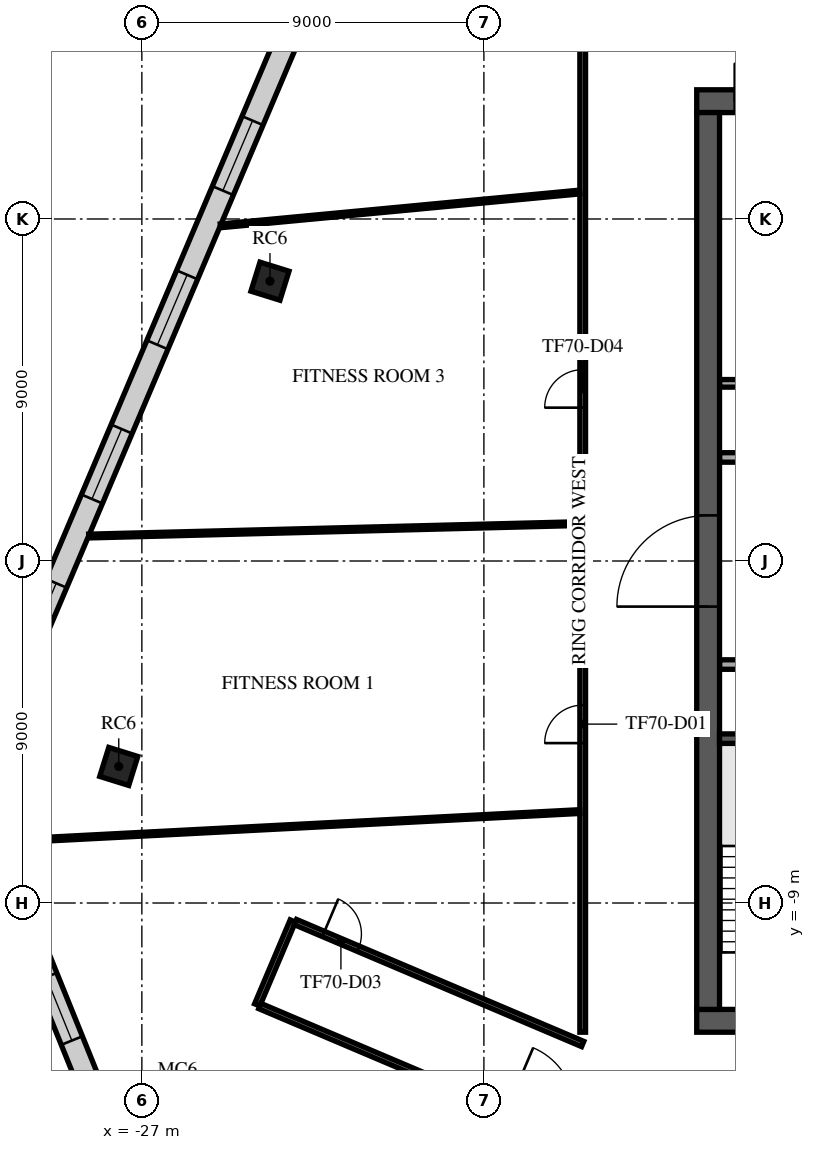
"""IFC4 building model, lengths in metres.
Left out: names, types, materials, properties, quantities, classifications, styles, units other than length and angle.
Written with IfcOpenShell. Run it as: python <this file> out.ifc"""

import sys

from ifc_helpers import new_model, si_unit, direction, frame, frame_2d, origin, origin_2d, place, context, subcontext, project, spatial, rectangle, extrude, element, fill, save


model = new_model("IFC4")
c1 = context("Model", 3, precision=1e-05, world=origin(), true_north=direction((0.0, 1.0)))
c2 = subcontext(c1, "Body", "Model", "MODEL_VIEW")
j1 = project(units=[si_unit("LENGTHUNIT", "METRE"), si_unit("PLANEANGLEUNIT", "RADIAN")], contexts=[c1])
p1 = place(None, origin())
s1 = spatial("IfcSite", under=j1, at=p1, CompositionType="ELEMENT")
p2 = place(p1, origin())
s2 = spatial("IfcBuilding", under=s1, at=p2, CompositionType="ELEMENT")
p3 = place(p2, frame((0.0, 0.0, 296.5)))
s3 = spatial("IfcBuildingStorey", under=s2, at=p3, CompositionType="ELEMENT", Elevation=296.5)
for number, where, z_axis, x_axis in (
    (1, (-23.629, 7.363, -0.35), (0.0, 0.0, 1.0), (0.298, 0.955, 0.0)),
    (2, (-27.608, -5.406, -0.35), (0.0, 0.0, 1.0), (0.298, 0.955, 0.0)),
):
    element("IfcColumn", number, at=place(p3, frame(where, z_axis=z_axis, x_axis=x_axis)), inside=s3, PredefinedType="COLUMN", context=c2, shape_type="SweptSolid", body=[
        extrude(rectangle(XDim=0.8, YDim=0.8, at=origin_2d()), origin(), (0.0, 0.0, 1.0), 4.35),
    ])
p4 = place(p3, frame((-12.4, 12.1, 0.0), z_axis=(0.0, 0.0, 1.0), x_axis=(1.0, 0.0, 0.0)))
e3 = element("IfcWall", 3, at=p4, inside=s3, PredefinedType="SHEAR", context=c2, shape_type="SweptSolid", body=[
    extrude(rectangle(XDim=24.8, YDim=0.6, at=frame_2d((12.4, 0.0))), origin(), (0.0, 0.0, 1.0), 3.65),
])
p5 = place(p4, frame((11.2, 0.0, 0.0)))
e4 = element("IfcOpeningElement", 4, at=p5, cuts=e3, PredefinedType="OPENING", context=c2, shape_type="SweptSolid", body=[
    extrude(rectangle(XDim=2.4, YDim=2.4, at=frame_2d((1.2, 1.2))), frame((0.0, 0.31, 0.0), z_axis=(0.0, -1.0, 0.0), x_axis=(1.0, 0.0, 0.0)), (0.0, 0.0, 1.0), 0.62),
])
p6 = place(p4, frame((22.025, 0.0, 0.0)))
e5 = element("IfcOpeningElement", 5, at=p6, cuts=e3, PredefinedType="OPENING", context=c2, shape_type="SweptSolid", body=[
    extrude(rectangle(XDim=1.2, YDim=2.1, at=frame_2d((0.6, 1.05))), frame((0.0, 0.31, 0.0), z_axis=(0.0, -1.0, 0.0), x_axis=(1.0, 0.0, 0.0)), (0.0, 0.0, 1.0), 0.62),
])
p7 = place(p4, frame((1.0, 0.0, 0.0)))
e6 = element("IfcOpeningElement", 6, at=p7, cuts=e3, PredefinedType="OPENING", context=c2, shape_type="SweptSolid", body=[
    extrude(rectangle(XDim=1.0, YDim=2.1, at=frame_2d((0.5, 1.05))), frame((0.0, 0.31, 0.0), z_axis=(0.0, -1.0, 0.0), x_axis=(1.0, 0.0, 0.0)), (0.0, 0.0, 1.0), 0.62),
])
p8 = place(p3, frame((-12.4, -12.1, 0.0), z_axis=(0.0, 0.0, 1.0), x_axis=(1.0, 0.0, 0.0)))
e7 = element("IfcWall", 7, at=p8, inside=s3, PredefinedType="SHEAR", context=c2, shape_type="SweptSolid", body=[
    extrude(rectangle(XDim=24.8, YDim=0.6, at=frame_2d((12.4, 0.0))), origin(), (0.0, 0.0, 1.0), 3.65),
])
p9 = place(p8, frame((7.3, 0.0, 0.0)))
e8 = element("IfcOpeningElement", 8, at=p9, cuts=e7, PredefinedType="OPENING", context=c2, shape_type="SweptSolid", body=[
    extrude(rectangle(XDim=2.0, YDim=2.1, at=frame_2d((1.0, 1.05))), frame((0.0, 0.31, 0.0), z_axis=(0.0, -1.0, 0.0), x_axis=(1.0, 0.0, 0.0)), (0.0, 0.0, 1.0), 0.62),
])
p10 = place(p8, frame((17.425, 0.0, 0.0)))
e9 = element("IfcOpeningElement", 9, at=p10, cuts=e7, PredefinedType="OPENING", context=c2, shape_type="SweptSolid", body=[
    extrude(rectangle(XDim=1.2, YDim=2.1, at=frame_2d((0.6, 1.05))), frame((0.0, 0.31, 0.0), z_axis=(0.0, -1.0, 0.0), x_axis=(1.0, 0.0, 0.0)), (0.0, 0.0, 1.0), 0.62),
])
p11 = place(p8, frame((1.575, 0.0, 0.0)))
e10 = element("IfcOpeningElement", 10, at=p11, cuts=e7, PredefinedType="OPENING", context=c2, shape_type="SweptSolid", body=[
    extrude(rectangle(XDim=1.2, YDim=2.1, at=frame_2d((0.6, 1.05))), frame((0.0, 0.31, 0.0), z_axis=(0.0, -1.0, 0.0), x_axis=(1.0, 0.0, 0.0)), (0.0, 0.0, 1.0), 0.62),
])
p12 = place(p8, frame((22.025, 0.0, 0.0)))
e11 = element("IfcOpeningElement", 11, at=p12, cuts=e7, PredefinedType="OPENING", context=c2, shape_type="SweptSolid", body=[
    extrude(rectangle(XDim=1.2, YDim=2.1, at=frame_2d((0.6, 1.05))), frame((0.0, 0.31, 0.0), z_axis=(0.0, -1.0, 0.0), x_axis=(1.0, 0.0, 0.0)), (0.0, 0.0, 1.0), 0.62),
])
p13 = place(p3, frame((-12.1, -11.8, 0.0), z_axis=(0.0, 0.0, 1.0), x_axis=(0.0, 1.0, 0.0)))
e12 = element("IfcWall", 12, at=p13, inside=s3, PredefinedType="SHEAR", context=c2, shape_type="SweptSolid", body=[
    extrude(rectangle(XDim=23.6, YDim=0.6, at=frame_2d((11.8, 0.0))), origin(), (0.0, 0.0, 1.0), 3.65),
])
p14 = place(p13, frame((10.6, 0.0, 0.0)))
e13 = element("IfcOpeningElement", 13, at=p14, cuts=e12, PredefinedType="OPENING", context=c2, shape_type="SweptSolid", body=[
    extrude(rectangle(XDim=2.4, YDim=2.4, at=frame_2d((1.2, 1.2))), frame((0.0, 0.31, 0.0), z_axis=(0.0, -1.0, 0.0), x_axis=(1.0, 0.0, 0.0)), (0.0, 0.0, 1.0), 0.62),
])
p15 = place(p3, frame((-8.65, -4.675, 0.0), z_axis=(0.0, 0.0, 1.0), x_axis=(-1.0, 0.0, 0.0)))
e14 = element("IfcWall", 14, at=p15, inside=s3, PredefinedType="SOLIDWALL", context=c2, shape_type="SweptSolid", body=[
    extrude(rectangle(XDim=3.15, YDim=0.25, at=frame_2d((1.575, 0.0))), origin(), (0.0, 0.0, 1.0), 3.65),
])
p16 = place(p3, frame((-11.795, -2.725, 0.0), z_axis=(0.0, 0.0, 1.0), x_axis=(1.0, 0.0, 0.0)))
e15 = element("IfcWall", 15, at=p16, inside=s3, PredefinedType="PARTITIONING", context=c2, shape_type="SweptSolid", body=[
    extrude(rectangle(XDim=14.415, YDim=0.25, at=frame_2d((7.208, 0.0))), origin(), (0.0, 0.0, 1.0), 3.65),
])
p17 = place(p16, frame((1.295, 0.0, 0.0)))
e16 = element("IfcOpeningElement", 16, at=p17, cuts=e15, PredefinedType="OPENING", context=c2, shape_type="SweptSolid", body=[
    extrude(rectangle(XDim=1.0, YDim=2.1, at=frame_2d((0.5, 1.05))), frame((0.0, 0.135, 0.0), z_axis=(0.0, -1.0, 0.0), x_axis=(1.0, 0.0, 0.0)), (0.0, 0.0, 1.0), 0.27),
])
p18 = place(p16, frame((4.42, 0.0, 0.0)))
e17 = element("IfcOpeningElement", 17, at=p18, cuts=e15, PredefinedType="OPENING", context=c2, shape_type="SweptSolid", body=[
    extrude(rectangle(XDim=1.0, YDim=2.1, at=frame_2d((0.5, 1.05))), frame((0.0, 0.135, 0.0), z_axis=(0.0, -1.0, 0.0), x_axis=(1.0, 0.0, 0.0)), (0.0, 0.0, 1.0), 0.27),
])
p19 = place(p16, frame((9.92, 0.0, 0.0)))
e18 = element("IfcOpeningElement", 18, at=p19, cuts=e15, PredefinedType="OPENING", context=c2, shape_type="SweptSolid", body=[
    extrude(rectangle(XDim=1.0, YDim=2.1, at=frame_2d((0.5, 1.05))), frame((0.0, 0.135, 0.0), z_axis=(0.0, -1.0, 0.0), x_axis=(1.0, 0.0, 0.0)), (0.0, 0.0, 1.0), 0.27),
])
p20 = place(p3, frame((-11.795, 2.725, 0.0), z_axis=(0.0, 0.0, 1.0), x_axis=(1.0, 0.0, 0.0)))
e19 = element("IfcWall", 19, at=p20, inside=s3, PredefinedType="PARTITIONING", context=c2, shape_type="SweptSolid", body=[
    extrude(rectangle(XDim=23.59, YDim=0.25, at=frame_2d((11.795, 0.0))), origin(), (0.0, 0.0, 1.0), 3.65),
])
p21 = place(p20, frame((21.345, 0.0, 0.0)))
e20 = element("IfcOpeningElement", 20, at=p21, cuts=e19, PredefinedType="OPENING", context=c2, shape_type="SweptSolid", body=[
    extrude(rectangle(XDim=0.9, YDim=2.1, at=frame_2d((0.45, 1.05))), frame((0.0, 0.135, 0.0), z_axis=(0.0, -1.0, 0.0), x_axis=(1.0, 0.0, 0.0)), (0.0, 0.0, 1.0), 0.27),
])
p22 = place(p20, frame((1.345, 0.0, 0.0)))
e21 = element("IfcOpeningElement", 21, at=p22, cuts=e19, PredefinedType="OPENING", context=c2, shape_type="SweptSolid", body=[
    extrude(rectangle(XDim=0.9, YDim=2.1, at=frame_2d((0.45, 1.05))), frame((0.0, 0.135, 0.0), z_axis=(0.0, -1.0, 0.0), x_axis=(1.0, 0.0, 0.0)), (0.0, 0.0, 1.0), 0.27),
])
p23 = place(p20, frame((4.42, 0.0, 0.0)))
e22 = element("IfcOpeningElement", 22, at=p23, cuts=e19, PredefinedType="OPENING", context=c2, shape_type="SweptSolid", body=[
    extrude(rectangle(XDim=1.0, YDim=2.1, at=frame_2d((0.5, 1.05))), frame((0.0, 0.135, 0.0), z_axis=(0.0, -1.0, 0.0), x_axis=(1.0, 0.0, 0.0)), (0.0, 0.0, 1.0), 0.27),
])
p24 = place(p20, frame((9.82, 0.0, 0.0)))
e23 = element("IfcOpeningElement", 23, at=p24, cuts=e19, PredefinedType="OPENING", context=c2, shape_type="SweptSolid", body=[
    extrude(rectangle(XDim=1.2, YDim=2.1, at=frame_2d((0.6, 1.05))), frame((0.0, 0.135, 0.0), z_axis=(0.0, -1.0, 0.0), x_axis=(1.0, 0.0, 0.0)), (0.0, 0.0, 1.0), 0.27),
])
p25 = place(p3, frame((-11.795, 4.675, 0.0), z_axis=(0.0, 0.0, 1.0), x_axis=(1.0, 0.0, 0.0)))
e24 = element("IfcWall", 24, at=p25, inside=s3, PredefinedType="PARTITIONING", context=c2, shape_type="SweptSolid", body=[
    extrude(rectangle(XDim=3.645, YDim=0.2, at=frame_2d((1.823, 0.0))), origin(), (0.0, 0.0, 1.0), 3.65),
])
p26 = place(p3, frame((-15.005, 32.985, 0.0), z_axis=(0.0, 0.0, 1.0), x_axis=(-0.39073034436, -0.920505186295, 0.0)))
e25 = element("IfcWall", 25, at=p26, inside=s3, PredefinedType="STANDARD", context=c2, shape_type="SweptSolid", body=[
    extrude(rectangle(XDim=48.49, YDim=0.6, at=frame_2d((24.245, 0.0))), origin(), (0.0, 0.0, 1.0), 3.65),
])
p27 = place(p26, frame((1.204, 0.0, 0.9)))
e26 = element("IfcOpeningElement", 26, at=p27, cuts=e25, PredefinedType="OPENING", context=c2, shape_type="SweptSolid", body=[
    extrude(rectangle(XDim=2.0, YDim=2.1, at=frame_2d((1.0, 1.05))), frame((0.0, 0.31, 0.0), z_axis=(0.0, -1.0, 0.0), x_axis=(1.0, 0.0, 0.0)), (0.0, 0.0, 1.0), 0.62),
])
p28 = place(p26, frame((5.612, 0.0, 0.9)))
e27 = element("IfcOpeningElement", 27, at=p28, cuts=e25, PredefinedType="OPENING", context=c2, shape_type="SweptSolid", body=[
    extrude(rectangle(XDim=2.0, YDim=2.1, at=frame_2d((1.0, 1.05))), frame((0.0, 0.31, 0.0), z_axis=(0.0, -1.0, 0.0), x_axis=(1.0, 0.0, 0.0)), (0.0, 0.0, 1.0), 0.62),
])
p29 = place(p26, frame((10.021, 0.0, 0.9)))
e28 = element("IfcOpeningElement", 28, at=p29, cuts=e25, PredefinedType="OPENING", context=c2, shape_type="SweptSolid", body=[
    extrude(rectangle(XDim=2.0, YDim=2.1, at=frame_2d((1.0, 1.05))), frame((0.0, 0.31, 0.0), z_axis=(0.0, -1.0, 0.0), x_axis=(1.0, 0.0, 0.0)), (0.0, 0.0, 1.0), 0.62),
])
p30 = place(p26, frame((14.428, 0.0, 0.9)))
e29 = element("IfcOpeningElement", 29, at=p30, cuts=e25, PredefinedType="OPENING", context=c2, shape_type="SweptSolid", body=[
    extrude(rectangle(XDim=2.0, YDim=2.1, at=frame_2d((1.0, 1.05))), frame((0.0, 0.31, 0.0), z_axis=(0.0, -1.0, 0.0), x_axis=(1.0, 0.0, 0.0)), (0.0, 0.0, 1.0), 0.62),
])
p31 = place(p26, frame((18.837, 0.0, 0.9)))
e30 = element("IfcOpeningElement", 30, at=p31, cuts=e25, PredefinedType="OPENING", context=c2, shape_type="SweptSolid", body=[
    extrude(rectangle(XDim=2.0, YDim=2.1, at=frame_2d((1.0, 1.05))), frame((0.0, 0.31, 0.0), z_axis=(0.0, -1.0, 0.0), x_axis=(1.0, 0.0, 0.0)), (0.0, 0.0, 1.0), 0.62),
])
p32 = place(p26, frame((23.245, 0.0, 0.9)))
e31 = element("IfcOpeningElement", 31, at=p32, cuts=e25, PredefinedType="OPENING", context=c2, shape_type="SweptSolid", body=[
    extrude(rectangle(XDim=2.0, YDim=2.1, at=frame_2d((1.0, 1.05))), frame((0.0, 0.31, 0.0), z_axis=(0.0, -1.0, 0.0), x_axis=(1.0, 0.0, 0.0)), (0.0, 0.0, 1.0), 0.62),
])
p33 = place(p26, frame((27.653, 0.0, 0.9)))
e32 = element("IfcOpeningElement", 32, at=p33, cuts=e25, PredefinedType="OPENING", context=c2, shape_type="SweptSolid", body=[
    extrude(rectangle(XDim=2.0, YDim=2.1, at=frame_2d((1.0, 1.05))), frame((0.0, 0.31, 0.0), z_axis=(0.0, -1.0, 0.0), x_axis=(1.0, 0.0, 0.0)), (0.0, 0.0, 1.0), 0.62),
])
p34 = place(p26, frame((32.061, 0.0, 0.9)))
e33 = element("IfcOpeningElement", 33, at=p34, cuts=e25, PredefinedType="OPENING", context=c2, shape_type="SweptSolid", body=[
    extrude(rectangle(XDim=2.0, YDim=2.1, at=frame_2d((1.0, 1.05))), frame((0.0, 0.31, 0.0), z_axis=(0.0, -1.0, 0.0), x_axis=(1.0, 0.0, 0.0)), (0.0, 0.0, 1.0), 0.62),
])
p35 = place(p26, frame((36.469, 0.0, 0.9)))
e34 = element("IfcOpeningElement", 34, at=p35, cuts=e25, PredefinedType="OPENING", context=c2, shape_type="SweptSolid", body=[
    extrude(rectangle(XDim=2.0, YDim=2.1, at=frame_2d((1.0, 1.05))), frame((0.0, 0.31, 0.0), z_axis=(0.0, -1.0, 0.0), x_axis=(1.0, 0.0, 0.0)), (0.0, 0.0, 1.0), 0.62),
])
p36 = place(p26, frame((40.877, 0.0, 0.9)))
e35 = element("IfcOpeningElement", 35, at=p36, cuts=e25, PredefinedType="OPENING", context=c2, shape_type="SweptSolid", body=[
    extrude(rectangle(XDim=2.0, YDim=2.1, at=frame_2d((1.0, 1.05))), frame((0.0, 0.31, 0.0), z_axis=(0.0, -1.0, 0.0), x_axis=(1.0, 0.0, 0.0)), (0.0, 0.0, 1.0), 0.62),
])
p37 = place(p26, frame((45.285, 0.0, 0.9)))
e36 = element("IfcOpeningElement", 36, at=p37, cuts=e25, PredefinedType="OPENING", context=c2, shape_type="SweptSolid", body=[
    extrude(rectangle(XDim=2.0, YDim=2.1, at=frame_2d((1.0, 1.05))), frame((0.0, 0.31, 0.0), z_axis=(0.0, -1.0, 0.0), x_axis=(1.0, 0.0, 0.0)), (0.0, 0.0, 1.0), 0.62),
])
p38 = place(p3, frame((-29.976, -9.815, 0.0), z_axis=(0.0, 0.0, 1.0), x_axis=(0.374622134294, -0.927177575493, 0.0)))
e37 = element("IfcWall", 37, at=p38, inside=s3, PredefinedType="STANDARD", context=c2, shape_type="SweptSolid", body=[
    extrude(rectangle(XDim=8.5, YDim=0.6, at=frame_2d((4.25, 0.0))), origin(), (0.0, 0.0, 1.0), 3.65),
])
p39 = place(p38, frame((1.225, 0.0, 0.9)))
e38 = element("IfcOpeningElement", 38, at=p39, cuts=e37, PredefinedType="OPENING", context=c2, shape_type="SweptSolid", body=[
    extrude(rectangle(XDim=1.8, YDim=2.1, at=frame_2d((0.9, 1.05))), frame((0.0, 0.31, 0.0), z_axis=(0.0, -1.0, 0.0), x_axis=(1.0, 0.0, 0.0)), (0.0, 0.0, 1.0), 0.62),
])
p40 = place(p3, frame((-23.965, -11.682, 0.0), z_axis=(0.0, 0.0, 1.0), x_axis=(0.390356552854, 0.920663761448, 0.0)))
e39 = element("IfcWall", 39, at=p40, inside=s3, PredefinedType="PARTITIONING", context=c2, shape_type="SweptSolid", body=[
    extrude(rectangle(XDim=2.4, YDim=0.15, at=frame_2d((1.2, 0.0))), origin(), (0.0, 0.0, 1.0), 3.25),
])
p41 = place(p3, frame((-23.896, -11.711, 0.0), z_axis=(0.0, 0.0, 1.0), x_axis=(0.920507643781, -0.390724554821, 0.0)))
e40 = element("IfcWall", 40, at=p41, inside=s3, PredefinedType="PARTITIONING", context=c2, shape_type="SweptSolid", body=[
    extrude(rectangle(XDim=34.917, YDim=0.15, at=frame_2d((17.458, 0.0))), origin(), (0.0, 0.0, 1.0), 3.25),
])
p42 = place(p41, frame((7.05, 0.0, 0.0)))
e41 = element("IfcOpeningElement", 41, at=p42, cuts=e40, PredefinedType="OPENING", context=c2, shape_type="SweptSolid", body=[
    extrude(rectangle(XDim=1.8, YDim=2.1, at=frame_2d((0.9, 1.05))), frame((0.0, 0.085, 0.0), z_axis=(0.0, -1.0, 0.0), x_axis=(1.0, 0.0, 0.0)), (0.0, 0.0, 1.0), 0.17),
])
p43 = place(p41, frame((14.27, 0.0, 0.0)))
e42 = element("IfcOpeningElement", 42, at=p43, cuts=e40, PredefinedType="OPENING", context=c2, shape_type="SweptSolid", body=[
    extrude(rectangle(XDim=1.0, YDim=2.1, at=frame_2d((0.5, 1.05))), frame((0.0, 0.085, 0.0), z_axis=(0.0, -1.0, 0.0), x_axis=(1.0, 0.0, 0.0)), (0.0, 0.0, 1.0), 0.17),
])
p44 = place(p41, frame((29.011, 0.0, 0.0)))
e43 = element("IfcOpeningElement", 43, at=p44, cuts=e40, PredefinedType="OPENING", context=c2, shape_type="SweptSolid", body=[
    extrude(rectangle(XDim=1.0, YDim=2.1, at=frame_2d((0.5, 1.05))), frame((0.0, 0.085, 0.0), z_axis=(0.0, -1.0, 0.0), x_axis=(1.0, 0.0, 0.0)), (0.0, 0.0, 1.0), 0.17),
])
p45 = place(p3, frame((-22.959, -9.501, 0.0), z_axis=(0.0, 0.0, 1.0), x_axis=(0.920500461351, -0.390741475471, 0.0)))
e44 = element("IfcWall", 44, at=p45, inside=s3, PredefinedType="PARTITIONING", context=c2, shape_type="SweptSolid", body=[
    extrude(rectangle(XDim=8.212, YDim=0.15, at=frame_2d((4.106, 0.0))), origin(), (0.0, 0.0, 1.0), 3.25),
])
p46 = place(p45, frame((0.8, 0.0, 0.0)))
e45 = element("IfcOpeningElement", 45, at=p46, cuts=e44, PredefinedType="OPENING", context=c2, shape_type="SweptSolid", body=[
    extrude(rectangle(XDim=1.0, YDim=2.1, at=frame_2d((0.5, 1.05))), frame((0.0, 0.085, 0.0), z_axis=(0.0, -1.0, 0.0), x_axis=(1.0, 0.0, 0.0)), (0.0, 0.0, 1.0), 0.17),
])
p47 = place(p3, frame((-15.4, -12.4, 0.0), z_axis=(0.0, 0.0, 1.0), x_axis=(0.0, 1.0, 0.0)))
e46 = element("IfcWall", 46, at=p47, inside=s3, PredefinedType="PARTITIONING", context=c2, shape_type="SweptSolid", body=[
    extrude(rectangle(XDim=27.8, YDim=0.15, at=frame_2d((13.9, 0.0))), origin(), (0.0, 0.0, 1.0), 3.25),
])
p48 = place(p47, frame((7.608, 0.0, 0.0)))
e47 = element("IfcOpeningElement", 47, at=p48, cuts=e46, PredefinedType="OPENING", context=c2, shape_type="SweptSolid", body=[
    extrude(rectangle(XDim=1.0, YDim=2.1, at=frame_2d((0.5, 1.05))), frame((0.0, 0.085, 0.0), z_axis=(0.0, -1.0, 0.0), x_axis=(1.0, 0.0, 0.0)), (0.0, 0.0, 1.0), 0.17),
])
p49 = place(p47, frame((16.435, 0.0, 0.0)))
e48 = element("IfcOpeningElement", 48, at=p49, cuts=e46, PredefinedType="OPENING", context=c2, shape_type="SweptSolid", body=[
    extrude(rectangle(XDim=1.0, YDim=2.1, at=frame_2d((0.5, 1.05))), frame((0.0, 0.085, 0.0), z_axis=(0.0, -1.0, 0.0), x_axis=(1.0, 0.0, 0.0)), (0.0, 0.0, 1.0), 0.17),
])
p50 = place(p3, frame((-31.836, -7.44, 0.0), z_axis=(0.0, 0.0, 1.0), x_axis=(0.998664003793, 0.05167405082, 0.0)))
e49 = element("IfcWall", 49, at=p50, inside=s3, PredefinedType="PARTITIONING", context=c2, shape_type="SweptSolid", body=[
    extrude(rectangle(XDim=16.38, YDim=0.1, at=frame_2d((8.19, 0.0))), origin(), (0.0, 0.0, 1.0), 3.65),
])
p51 = place(p3, frame((-28.399, 0.657, 0.0), z_axis=(0.0, 0.0, 1.0), x_axis=(0.999679226592, 0.025326743172, 0.0)))
e50 = element("IfcWall", 50, at=p51, inside=s3, PredefinedType="PARTITIONING", context=c2, shape_type="SweptSolid", body=[
    extrude(rectangle(XDim=12.927, YDim=0.1, at=frame_2d((6.463, 0.0))), origin(), (0.0, 0.0, 1.0), 3.25),
])
p52 = place(p3, frame((-24.934, 8.819, 0.0), z_axis=(0.0, 0.0, 1.0), x_axis=(0.995594865602, 0.0937596053, 0.0)))
e51 = element("IfcWall", 51, at=p52, inside=s3, PredefinedType="PARTITIONING", context=c2, shape_type="SweptSolid", body=[
    extrude(rectangle(XDim=9.496, YDim=0.1, at=frame_2d((4.748, 0.0))), origin(), (0.0, 0.0, 1.0), 3.65),
])
p53 = place(p14, origin())
e52 = element("IfcDoor", 52, at=p53, inside=s3, OperationType="SINGLE_SWING_LEFT", PredefinedType="DOOR", context=c2, shape_type="SweptSolid", body=[
    extrude(rectangle(XDim=2.4, YDim=2.4, at=frame_2d((1.2, 1.2))), frame((0.0, 0.025, 0.0), z_axis=(0.0, -1.0, 0.0), x_axis=(1.0, 0.0, 0.0)), (0.0, 0.0, 1.0), 0.05),
])
fill(e13, e52)
p54 = place(p32, origin())
e53 = element("IfcWindow", 53, at=p54, inside=s3, PartitioningType="SINGLE_PANEL", PredefinedType="WINDOW", context=c2, shape_type="SweptSolid", body=[
    extrude(rectangle(XDim=2.0, YDim=2.1, at=frame_2d((1.0, 1.05))), frame((0.0, 0.03, 0.0), z_axis=(0.0, -1.0, 0.0), x_axis=(1.0, 0.0, 0.0)), (0.0, 0.0, 1.0), 0.06),
])
fill(e31, e53)
p55 = place(p33, origin())
e54 = element("IfcWindow", 54, at=p55, inside=s3, PartitioningType="SINGLE_PANEL", PredefinedType="WINDOW", context=c2, shape_type="SweptSolid", body=[
    extrude(rectangle(XDim=2.0, YDim=2.1, at=frame_2d((1.0, 1.05))), frame((0.0, 0.03, 0.0), z_axis=(0.0, -1.0, 0.0), x_axis=(1.0, 0.0, 0.0)), (0.0, 0.0, 1.0), 0.06),
])
fill(e32, e54)
p56 = place(p34, origin())
e55 = element("IfcWindow", 55, at=p56, inside=s3, PartitioningType="SINGLE_PANEL", PredefinedType="WINDOW", context=c2, shape_type="SweptSolid", body=[
    extrude(rectangle(XDim=2.0, YDim=2.1, at=frame_2d((1.0, 1.05))), frame((0.0, 0.03, 0.0), z_axis=(0.0, -1.0, 0.0), x_axis=(1.0, 0.0, 0.0)), (0.0, 0.0, 1.0), 0.06),
])
fill(e33, e55)
p57 = place(p35, origin())
e56 = element("IfcWindow", 56, at=p57, inside=s3, PartitioningType="SINGLE_PANEL", PredefinedType="WINDOW", context=c2, shape_type="SweptSolid", body=[
    extrude(rectangle(XDim=2.0, YDim=2.1, at=frame_2d((1.0, 1.05))), frame((0.0, 0.03, 0.0), z_axis=(0.0, -1.0, 0.0), x_axis=(1.0, 0.0, 0.0)), (0.0, 0.0, 1.0), 0.06),
])
fill(e34, e56)
p58 = place(p39, origin())
e57 = element("IfcWindow", 57, at=p58, inside=s3, PartitioningType="SINGLE_PANEL", PredefinedType="WINDOW", context=c2, shape_type="SweptSolid", body=[
    extrude(rectangle(XDim=1.8, YDim=2.1, at=frame_2d((0.9, 1.05))), frame((0.0, 0.03, 0.0), z_axis=(0.0, -1.0, 0.0), x_axis=(1.0, 0.0, 0.0)), (0.0, 0.0, 1.0), 0.06),
])
fill(e38, e57)
p59 = place(p48, origin())
e58 = element("IfcDoor", 58, at=p59, inside=s3, OperationType="SINGLE_SWING_RIGHT", PredefinedType="DOOR", context=c2, shape_type="SweptSolid", body=[
    extrude(rectangle(XDim=1.0, YDim=2.1, at=frame_2d((0.5, 1.05))), frame((0.0, 0.025, 0.0), z_axis=(0.0, -1.0, 0.0), x_axis=(1.0, 0.0, 0.0)), (0.0, 0.0, 1.0), 0.05),
])
fill(e47, e58)
p60 = place(p46, origin())
e59 = element("IfcDoor", 59, at=p60, inside=s3, OperationType="SINGLE_SWING_RIGHT", PredefinedType="DOOR", context=c2, shape_type="SweptSolid", body=[
    extrude(rectangle(XDim=1.0, YDim=2.1, at=frame_2d((0.5, 1.05))), frame((0.0, 0.025, 0.0), z_axis=(0.0, -1.0, 0.0), x_axis=(1.0, 0.0, 0.0)), (0.0, 0.0, 1.0), 0.05),
])
fill(e45, e59)
p61 = place(p49, origin())
e60 = element("IfcDoor", 60, at=p61, inside=s3, OperationType="SINGLE_SWING_LEFT", PredefinedType="DOOR", context=c2, shape_type="SweptSolid", body=[
    extrude(rectangle(XDim=1.0, YDim=2.1, at=frame_2d((0.5, 1.05))), frame((0.0, 0.025, 0.0), z_axis=(0.0, -1.0, 0.0), x_axis=(1.0, 0.0, 0.0)), (0.0, 0.0, 1.0), 0.05),
])
fill(e48, e60)
save(model, sys.argv[1])
